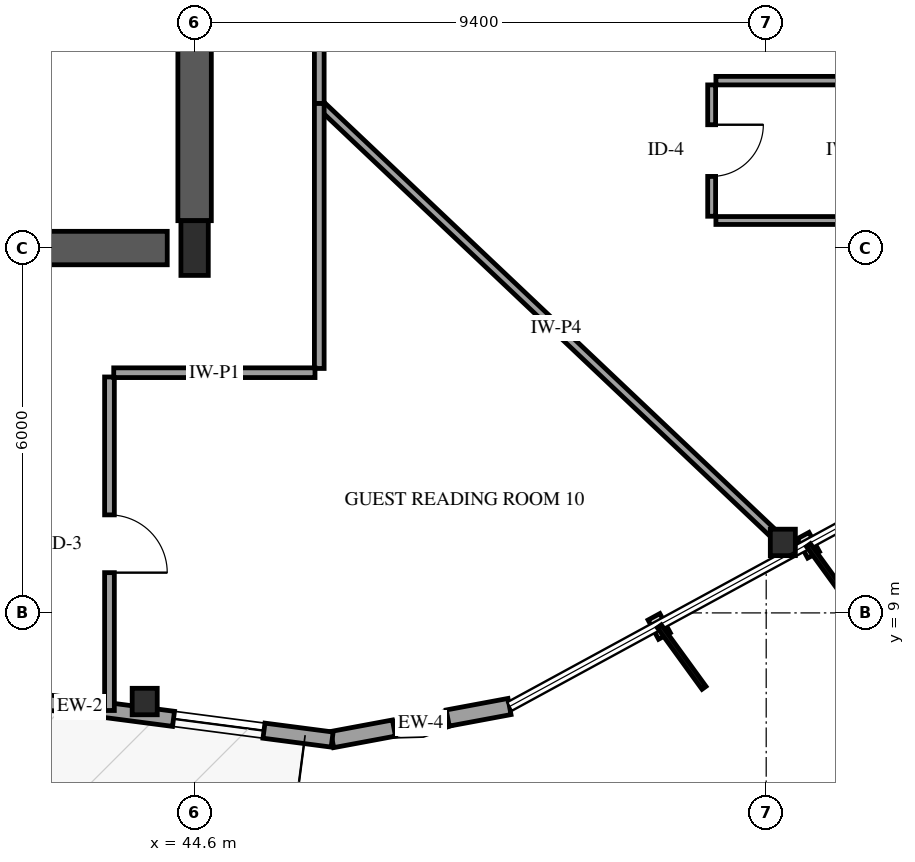
"""IFC4 building model, lengths in metres.
Left out: names, types, materials, properties, quantities, classifications, styles, units other than length and angle.
Written with IfcOpenShell. Run it as: python <this file> out.ifc"""

import sys

from ifc_helpers import new_model, si_unit, direction, frame, frame_2d, origin, origin_2d, place, context, subcontext, project, spatial, rectangle, i_section, extrude, element, fill, save


model = new_model("IFC4")
c1 = context("Model", 3, precision=1e-05, world=origin(), true_north=direction((0.0, 1.0)))
c2 = subcontext(c1, "Body", "Model", "MODEL_VIEW")
j1 = project(units=[si_unit("LENGTHUNIT", "METRE"), si_unit("PLANEANGLEUNIT", "RADIAN")], contexts=[c1])
p1 = place(None, origin())
s1 = spatial("IfcSite", under=j1, at=p1, CompositionType="ELEMENT")
p2 = place(p1, origin())
s2 = spatial("IfcBuilding", under=s1, at=p2, CompositionType="ELEMENT")
p3 = place(p2, frame((0.0, 0.0, 139.0)))
s3 = spatial("IfcBuildingStorey", under=s2, at=p3, CompositionType="ELEMENT", Elevation=139.0)
p4 = place(p3, frame((41.3, 15.0, 0.0), z_axis=(0.0, 0.0, 1.0), x_axis=(1.0, 0.0, 0.0)))
e1 = element("IfcWall", 1, at=p4, inside=s3, PredefinedType="SHEAR", context=c2, shape_type="SweptSolid", body=[
    extrude(rectangle(XDim=2.85, YDim=0.55, at=frame_2d((1.425, 0.0))), origin(), (0.0, 0.0, 1.0), 3.6),
])
p5 = place(p3, frame((44.6, 15.45, 0.0), z_axis=(0.0, 0.0, 1.0), x_axis=(0.0, 1.0, 0.0)))
e2 = element("IfcWall", 2, at=p5, inside=s3, PredefinedType="SHEAR", context=c2, shape_type="SweptSolid", body=[
    extrude(rectangle(XDim=6.35, YDim=0.55, at=frame_2d((3.175, 0.0))), origin(), (0.0, 0.0, 1.0), 3.6),
])
p6 = place(p3, frame((44.6, 15.0, -0.3), z_axis=(0.0, 0.0, 1.0), x_axis=(1.0, 0.0, 0.0)))
e3 = element("IfcColumn", 3, at=p6, inside=s3, PredefinedType="PILASTER", context=c2, shape_type="SweptSolid", body=[
    extrude(rectangle(XDim=0.45, YDim=0.9, at=origin_2d()), origin(), (0.0, 0.0, 1.0), 3.9),
])
for number, where, z_axis, x_axis in (
    (4, (43.779, 7.542, -0.3), (0.0, 0.0, 1.0), (1.0, 0.0, 0.0)),
    (5, (54.274, 10.159, -0.3), (0.0, 0.0, 1.0), (1.0, 0.0, 0.0)),
):
    element("IfcColumn", number, at=place(p3, frame(where, z_axis=z_axis, x_axis=x_axis)), inside=s3, PredefinedType="COLUMN", context=c2, shape_type="SweptSolid", body=[
        extrude(i_section(OverallWidth=0.412, OverallDepth=0.435, WebThickness=0.036, FlangeThickness=0.057, FilletRadius=0.038, at=origin_2d()), origin(), (0.0, 0.0, 1.0), 3.9),
    ])
p7 = place(p3, frame((46.862, 6.917, 0.0), z_axis=(0.0, 0.0, 1.0), x_axis=(0.983060801599, 0.183279732538, 0.0)))
e6 = element("IfcWall", 6, at=p7, inside=s3, PredefinedType="SOLIDWALL", context=c2, shape_type="SweptSolid", body=[
    extrude(rectangle(XDim=2.967, YDim=0.27, at=frame_2d((1.483, 0.0))), origin(), (0.0, 0.0, 1.0), 2.679),
])
p8 = place(p7, frame((1.033, 0.0, 0.75)))
e7 = element("IfcOpeningElement", 7, at=p8, cuts=e6, PredefinedType="OPENING", context=c2, shape_type="SweptSolid", body=[
    extrude(rectangle(XDim=0.9, YDim=1.5, at=frame_2d((0.45, 0.75))), frame((0.0, 0.145, 0.0), z_axis=(0.0, -1.0, 0.0), x_axis=(1.0, 0.0, 0.0)), (0.0, 0.0, 1.0), 0.29),
])
p9 = place(p3, frame((38.557, 8.002, 0.0), z_axis=(0.0, 0.0, 1.0), x_axis=(0.991579431853, -0.129499924037, 0.0)))
e8 = element("IfcWall", 8, at=p9, inside=s3, PredefinedType="SOLIDWALL", context=c2, shape_type="SweptSolid", body=[
    extrude(rectangle(XDim=8.376, YDim=0.25, at=frame_2d((4.188, 0.0))), origin(), (0.0, 0.0, 1.0), 2.679),
])
p10 = place(p9, frame((0.65, 0.0, 0.0)))
e9 = element("IfcOpeningElement", 9, at=p10, cuts=e8, PredefinedType="OPENING", context=c2, shape_type="SweptSolid", body=[
    extrude(rectangle(XDim=1.0, YDim=2.15, at=frame_2d((0.5, 1.075))), frame((0.0, 0.135, 0.0), z_axis=(0.0, -1.0, 0.0), x_axis=(1.0, 0.0, 0.0)), (0.0, 0.0, 1.0), 0.27),
])
p11 = place(p9, frame((5.745, 0.0, 0.72)))
e10 = element("IfcOpeningElement", 10, at=p11, cuts=e8, PredefinedType="OPENING", context=c2, shape_type="SweptSolid", body=[
    extrude(rectangle(XDim=1.5, YDim=1.7, at=frame_2d((0.75, 0.85))), frame((0.0, 0.135, 0.0), z_axis=(0.0, -1.0, 0.0), x_axis=(1.0, 0.0, 0.0)), (0.0, 0.0, 1.0), 0.27),
])
p12 = place(p3, frame((46.65, 17.377, 0.0), z_axis=(0.0, 0.0, 1.0), x_axis=(0.726136795553, -0.687550255722, 0.0)))
e11 = element("IfcWall", 11, at=p12, inside=s3, PredefinedType="PARTITIONING", context=c2, shape_type="SweptSolid", body=[
    extrude(rectangle(XDim=10.731, YDim=0.14, at=frame_2d((5.365, 0.0))), origin(), (0.0, 0.0, 1.0), 2.595),
])
p13 = place(p3, frame((43.2, 12.88, 0.0), z_axis=(0.0, 0.0, 1.0), x_axis=(0.0, -1.0, 0.0)))
e12 = element("IfcWall", 12, at=p13, inside=s3, PredefinedType="PARTITIONING", context=c2, shape_type="SweptSolid", body=[
    extrude(rectangle(XDim=5.485, YDim=0.16, at=frame_2d((2.742, 0.0))), origin(), (0.0, 0.0, 1.0), 2.595),
])
p14 = place(p13, frame((2.268, 0.0, 0.0)))
e13 = element("IfcOpeningElement", 13, at=p14, cuts=e12, PredefinedType="OPENING", context=c2, shape_type="SweptSolid", body=[
    extrude(rectangle(XDim=0.95, YDim=2.15, at=frame_2d((0.475, 1.075))), frame((0.0, 0.09, 0.0), z_axis=(0.0, -1.0, 0.0), x_axis=(1.0, 0.0, 0.0)), (0.0, 0.0, 1.0), 0.18),
])
p15 = place(p3, frame((46.65, 22.668, 0.0), z_axis=(0.0, 0.0, 1.0), x_axis=(0.0, -1.0, 0.0)))
e14 = element("IfcWall", 14, at=p15, inside=s3, PredefinedType="PARTITIONING", context=c2, shape_type="SweptSolid", body=[
    extrude(rectangle(XDim=5.291, YDim=0.16, at=frame_2d((2.646, 0.0))), origin(), (0.0, 0.0, 1.0), 3.3),
])
p16 = place(p15, frame((2.171, 0.0, 0.0)))
e15 = element("IfcOpeningElement", 15, at=p16, cuts=e14, PredefinedType="OPENING", context=c2, shape_type="SweptSolid", body=[
    extrude(rectangle(XDim=0.95, YDim=2.15, at=frame_2d((0.475, 1.075))), frame((0.0, 0.09, 0.0), z_axis=(0.0, -1.0, 0.0), x_axis=(1.0, 0.0, 0.0)), (0.0, 0.0, 1.0), 0.18),
])
p17 = place(p3, frame((46.65, 17.377, 0.0), z_axis=(0.0, 0.0, 1.0), x_axis=(0.0, -1.0, 0.0)))
e16 = element("IfcWall", 16, at=p17, inside=s3, PredefinedType="PARTITIONING", context=c2, shape_type="SweptSolid", body=[
    extrude(rectangle(XDim=4.357, YDim=0.16, at=frame_2d((2.178, 0.0))), origin(), (0.0, 0.0, 1.0), 3.3),
])
p18 = place(p3, frame((46.58, 12.95, 0.0), z_axis=(0.0, 0.0, 1.0), x_axis=(-1.0, 0.0, 0.0)))
e17 = element("IfcWall", 17, at=p18, inside=s3, PredefinedType="PARTITIONING", context=c2, shape_type="SweptSolid", body=[
    extrude(rectangle(XDim=3.31, YDim=0.16, at=frame_2d((1.655, 0.0))), origin(), (0.0, 0.0, 1.0), 3.3),
])
p19 = place(p3, frame((53.103, 17.683, 0.0), z_axis=(0.0, 0.0, 1.0), x_axis=(0.0, -1.0, 0.0)))
e18 = element("IfcWall", 18, at=p19, inside=s3, PredefinedType="PARTITIONING", context=c2, shape_type="SweptSolid", body=[
    extrude(rectangle(XDim=2.16, YDim=0.13, at=frame_2d((1.08, 0.0))), origin(), (0.0, 0.0, 1.0), 3.3),
])
p20 = place(p19, frame((0.655, 0.0, 0.0)))
e19 = element("IfcOpeningElement", 19, at=p20, cuts=e18, PredefinedType="OPENING", context=c2, shape_type="SweptSolid", body=[
    extrude(rectangle(XDim=0.85, YDim=2.1, at=frame_2d((0.425, 1.05))), frame((0.0, 0.075, 0.0), z_axis=(0.0, -1.0, 0.0), x_axis=(1.0, 0.0, 0.0)), (0.0, 0.0, 1.0), 0.15),
])
p21 = place(p3, frame((55.333, 17.753, 0.0), z_axis=(0.0, 0.0, 1.0), x_axis=(-1.0, 0.0, 0.0)))
e20 = element("IfcWall", 20, at=p21, inside=s3, PredefinedType="PARTITIONING", context=c2, shape_type="SweptSolid", body=[
    extrude(rectangle(XDim=2.16, YDim=0.14, at=frame_2d((1.08, 0.0))), origin(), (0.0, 0.0, 1.0), 3.3),
])
p22 = place(p3, frame((53.173, 15.453, 0.0), z_axis=(0.0, 0.0, 1.0), x_axis=(1.0, 0.0, 0.0)))
e21 = element("IfcWall", 21, at=p22, inside=s3, PredefinedType="PARTITIONING", context=c2, shape_type="SweptSolid", body=[
    extrude(rectangle(XDim=2.16, YDim=0.13, at=frame_2d((1.08, 0.0))), origin(), (0.0, 0.0, 1.0), 3.3),
])
p23 = place(p8, origin())
e22 = element("IfcWindow", 22, at=p23, inside=s3, PartitioningType="SINGLE_PANEL", PredefinedType="WINDOW", context=c2, shape_type="SweptSolid", body=[
    extrude(rectangle(XDim=0.9, YDim=1.5, at=frame_2d((0.45, 0.75))), frame((0.0, 0.03, 0.0), z_axis=(0.0, -1.0, 0.0), x_axis=(1.0, 0.0, 0.0)), (0.0, 0.0, 1.0), 0.06),
])
fill(e7, e22)
p24 = place(p11, origin())
e23 = element("IfcWindow", 23, at=p24, inside=s3, PartitioningType="SINGLE_PANEL", PredefinedType="WINDOW", context=c2, shape_type="SweptSolid", body=[
    extrude(rectangle(XDim=1.5, YDim=1.7, at=frame_2d((0.75, 0.85))), frame((0.0, 0.03, 0.0), z_axis=(0.0, -1.0, 0.0), x_axis=(1.0, 0.0, 0.0)), (0.0, 0.0, 1.0), 0.06),
])
fill(e10, e23)
p25 = place(p14, origin())
e24 = element("IfcDoor", 24, at=p25, inside=s3, OperationType="SINGLE_SWING_RIGHT", PredefinedType="DOOR", context=c2, shape_type="SweptSolid", body=[
    extrude(rectangle(XDim=0.95, YDim=2.15, at=frame_2d((0.475, 1.075))), frame((0.0, 0.025, 0.0), z_axis=(0.0, -1.0, 0.0), x_axis=(1.0, 0.0, 0.0)), (0.0, 0.0, 1.0), 0.05),
])
fill(e13, e24)
p26 = place(p20, origin())
e25 = element("IfcDoor", 25, at=p26, inside=s3, OperationType="SINGLE_SWING_LEFT", PredefinedType="DOOR", context=c2, shape_type="SweptSolid", body=[
    extrude(rectangle(XDim=0.85, YDim=2.1, at=frame_2d((0.425, 1.05))), frame((0.0, 0.025, 0.0), z_axis=(0.0, -1.0, 0.0), x_axis=(1.0, 0.0, 0.0)), (0.0, 0.0, 1.0), 0.05),
])
fill(e19, e25)
save(model, sys.argv[1])
